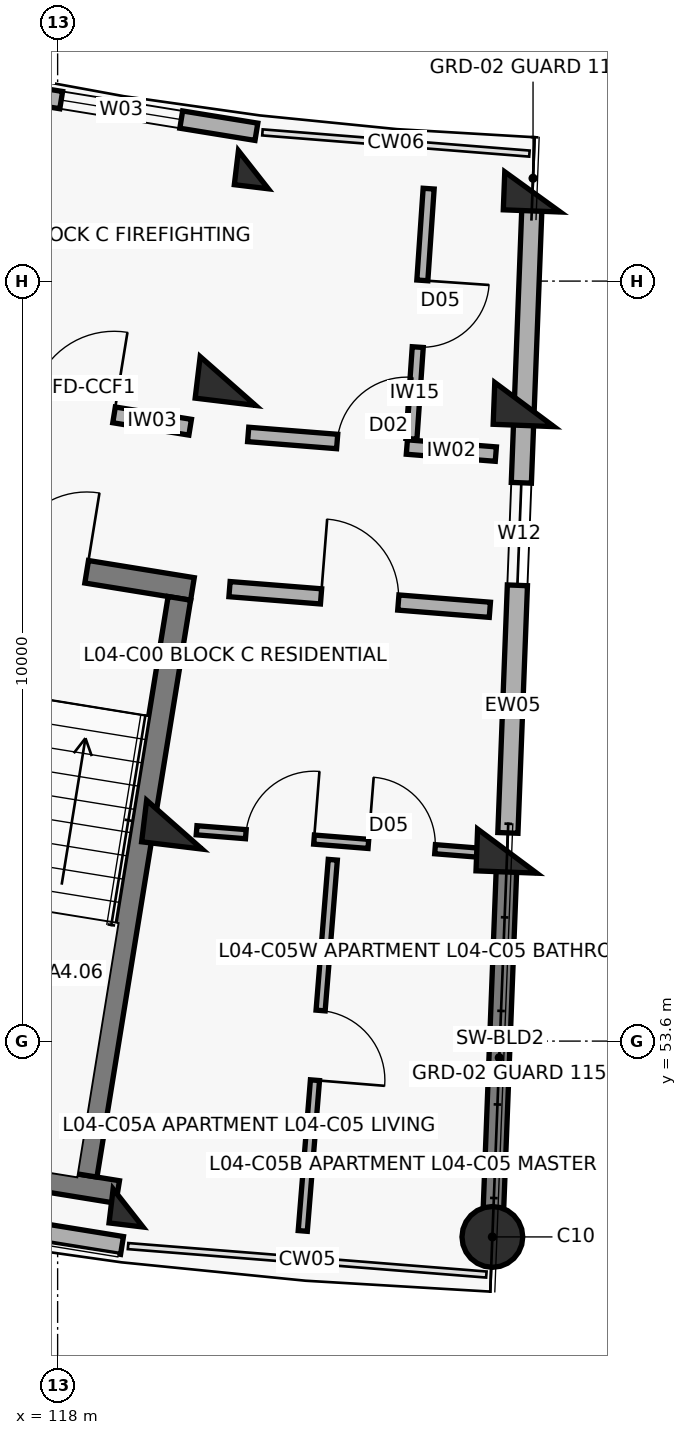
"""IFC4 building model, lengths in metres.
Left out: names, types, materials, properties, quantities, classifications, styles, units other than length and angle.
Written with IfcOpenShell. Run it as: python <this file> out.ifc"""

import sys

from ifc_helpers import new_model, si_unit, direction, frame, frame_2d, origin, origin_2d, place, context, subcontext, project, spatial, rectangle, circle, extrude, element, fill, save


model = new_model("IFC4")
c1 = context("Model", 3, precision=1e-05, world=origin(), true_north=direction((0.0, 1.0)))
c2 = subcontext(c1, "Body", "Model", "MODEL_VIEW")
j1 = project(units=[si_unit("LENGTHUNIT", "METRE"), si_unit("PLANEANGLEUNIT", "RADIAN")], contexts=[c1])
p1 = place(None, origin())
s1 = spatial("IfcSite", under=j1, at=p1, CompositionType="ELEMENT")
p2 = place(p1, origin())
s2 = spatial("IfcBuilding", under=s1, at=p2, CompositionType="ELEMENT")
p3 = place(p2, frame((0.0, 0.0, 14.3)))
s3 = spatial("IfcBuildingStorey", under=s2, at=p3, CompositionType="ELEMENT", Elevation=14.3)
p4 = place(p3, frame((120.575, 65.065, 0.0), z_axis=(0.0, 0.0, 1.0), x_axis=(-0.119790293837, -0.992799217114, 0.0)))
e1 = element("IfcColumn", 1, at=p4, inside=s3, PredefinedType="COLUMN", context=c2, shape_type="SweptSolid", body=[
    extrude(rectangle(XDim=0.45, YDim=0.45, at=origin_2d()), origin(), (0.0, 0.0, 1.0), 3.1),
])
for number, where, z_axis, x_axis in (
    (2, (120.24, 62.285, 0.0), (0.0, 0.0, 1.0), (-0.12, -0.993, 0.0)),
    (3, (119.535, 56.448, 0.0), (0.0, 0.0, 1.0), (-0.12, -0.993, 0.0)),
):
    element("IfcColumn", number, at=place(p3, frame(where, z_axis=z_axis, x_axis=x_axis)), inside=s3, PredefinedType="COLUMN", context=c2, shape_type="SweptSolid", body=[
        extrude(rectangle(XDim=0.55, YDim=0.8, at=origin_2d()), origin(), (0.0, 0.0, 1.0), 3.1),
    ])
p5 = place(p3, frame((118.927, 51.404, 0.0), z_axis=(0.0, 0.0, 1.0), x_axis=(-0.119790293837, -0.992799217114, 0.0)))
e4 = element("IfcColumn", 4, at=p5, inside=s3, PredefinedType="COLUMN", context=c2, shape_type="SweptSolid", body=[
    extrude(rectangle(XDim=0.45, YDim=0.45, at=origin_2d()), origin(), (0.0, 0.0, 1.0), 3.1),
])
p6 = place(p3, frame((124.248, 64.773, 0.0), z_axis=(0.0, 0.0, 1.0), x_axis=(-0.038387809088, -0.999262916411, 0.0)))
e5 = element("IfcColumn", 5, at=p6, inside=s3, PredefinedType="COLUMN", context=c2, shape_type="SweptSolid", body=[
    extrude(rectangle(XDim=0.5, YDim=0.75, at=origin_2d()), origin(), (0.0, 0.0, 1.0), 3.1),
])
for number, where, z_axis, x_axis in (
    (6, (124.14, 61.975, 0.0), (0.0, 0.0, 1.0), (-0.038, -0.999, 0.0)),
    (7, (123.915, 56.1, 0.0), (0.0, 0.0, 1.0), (-0.038, -0.999, 0.0)),
):
    element("IfcColumn", number, at=place(p3, frame(where, z_axis=z_axis, x_axis=x_axis)), inside=s3, PredefinedType="COLUMN", context=c2, shape_type="SweptSolid", body=[
        extrude(rectangle(XDim=0.55, YDim=0.8, at=origin_2d()), origin(), (0.0, 0.0, 1.0), 3.1),
    ])
p7 = place(p3, frame((123.72, 51.023, 0.0), z_axis=(0.0, 0.0, 1.0), x_axis=(-0.038387809088, -0.999262916411, 0.0)))
e8 = element("IfcColumn", 8, at=p7, inside=s3, PredefinedType="COLUMN", context=c2, shape_type="SweptSolid", body=[
    extrude(circle(Radius=0.4, at=origin_2d()), origin(), (0.0, 0.0, 1.0), 3.1),
])
p8 = place(p3, frame((123.908, 55.92, 0.0), z_axis=(0.0, 0.0, 1.0), x_axis=(-0.038381471406, -0.99926315986, 0.0)))
e9 = element("IfcWall", 9, at=p8, inside=s3, PredefinedType="SHEAR", context=c2, shape_type="SweptSolid", body=[
    extrude(rectangle(XDim=4.72, YDim=0.27, at=frame_2d((2.36, 0.0))), origin(), (0.0, 0.0, 1.0), 2.86),
])
p9 = place(p3, frame((114.1, 51.681, 0.0), z_axis=(0.0, 0.0, 1.0), x_axis=(0.987080750493, -0.160223568819, 0.0)))
e10 = element("IfcWall", 10, at=p9, inside=s3, PredefinedType="SOLIDWALL", context=c2, shape_type="SweptSolid", body=[
    extrude(rectangle(XDim=4.809, YDim=0.238, at=frame_2d((2.404, 0.0))), origin(), (0.0, 0.0, 1.0), 2.25),
])
p10 = place(p3, frame((117.058, 66.142, 0.0), z_axis=(0.0, 0.0, 1.0), x_axis=(0.987080874485, -0.160222804952, 0.0)))
e11 = element("IfcWall", 11, at=p10, inside=s3, PredefinedType="SOLIDWALL", context=c2, shape_type="SweptSolid", body=[
    extrude(rectangle(XDim=3.604, YDim=0.23, at=frame_2d((1.802, 0.0))), origin(), (0.0, 0.0, 1.0), 2.25),
])
p11 = place(p10, frame((1.002, 0.0, 0.32)))
e12 = element("IfcOpeningElement", 12, at=p11, cuts=e11, PredefinedType="OPENING", context=c2, shape_type="SweptSolid", body=[
    extrude(rectangle(XDim=1.6, YDim=1.5, at=frame_2d((0.8, 0.75))), frame((0.0, 0.125, 0.0), z_axis=(0.0, -1.0, 0.0), x_axis=(1.0, 0.0, 0.0)), (0.0, 0.0, 1.0), 0.25),
])
p12 = place(p3, frame((124.239, 64.533, 0.0), z_axis=(0.0, 0.0, 1.0), x_axis=(-0.038407966241, -0.999262141847, 0.0)))
e13 = element("IfcWall", 13, at=p12, inside=s3, PredefinedType="SOLIDWALL", context=c2, shape_type="SweptSolid", body=[
    extrude(rectangle(XDim=8.2, YDim=0.265, at=frame_2d((4.1, 0.0))), origin(), (0.0, 0.0, 1.0), 2.08),
])
p13 = place(p12, frame((3.59, 0.0, 0.75)))
e14 = element("IfcOpeningElement", 14, at=p13, cuts=e13, PredefinedType="OPENING", context=c2, shape_type="SweptSolid", body=[
    extrude(rectangle(XDim=1.35, YDim=1.35, at=frame_2d((0.675, 0.675))), frame((0.0, 0.142, 0.0), z_axis=(0.0, -1.0, 0.0), x_axis=(1.0, 0.0, 0.0)), (0.0, 0.0, 1.0), 0.285),
])
p14 = place(p3, frame((115.954, 60.169, 0.0), z_axis=(0.0, 0.0, 1.0), x_axis=(0.987077443397, -0.160243941341, 0.0)))
e15 = element("IfcWall", 15, at=p14, inside=s3, PredefinedType="SHEAR", context=c2, shape_type="SweptSolid", body=[
    extrude(rectangle(XDim=3.87, YDim=0.3, at=frame_2d((1.935, 0.0))), origin(), (0.0, 0.0, 1.0), 3.1),
])
p15 = place(p14, frame((1.41, 0.0, 0.0)))
e16 = element("IfcOpeningElement", 16, at=p15, cuts=e15, PredefinedType="OPENING", context=c2, shape_type="SweptSolid", body=[
    extrude(rectangle(XDim=1.05, YDim=2.15, at=frame_2d((0.525, 1.075))), frame((0.0, 0.16, 0.0), z_axis=(0.0, -1.0, 0.0), x_axis=(1.0, 0.0, 0.0)), (0.0, 0.0, 1.0), 0.32),
])
p16 = place(p3, frame((114.377, 52.331, 0.0), z_axis=(0.0, 0.0, 1.0), x_axis=(0.987077474317, -0.16024375088, 0.0)))
e17 = element("IfcWall", 17, at=p16, inside=s3, PredefinedType="SHEAR", context=c2, shape_type="SweptSolid", body=[
    extrude(rectangle(XDim=4.47, YDim=0.3, at=frame_2d((2.235, 0.0))), origin(), (0.0, 0.0, 1.0), 3.1),
])
p17 = place(p3, frame((119.602, 59.425, 0.0), z_axis=(0.0, 0.0, 1.0), x_axis=(-0.160201584773, -0.987084318706, 0.0)))
e18 = element("IfcWall", 18, at=p17, inside=s3, PredefinedType="SHEAR", context=c2, shape_type="SweptSolid", body=[
    extrude(rectangle(XDim=7.69, YDim=0.3, at=frame_2d((3.845, 0.0))), origin(), (0.0, 0.0, 1.0), 3.1),
])
p18 = place(p3, frame((116.656, 62.178, 0.0), z_axis=(0.0, 0.0, 1.0), x_axis=(0.987083140276, -0.16020884552, 0.0)))
e19 = element("IfcWall", 19, at=p18, inside=s3, PredefinedType="SOLIDWALL", context=c2, shape_type="SweptSolid", body=[
    extrude(rectangle(XDim=3.129, YDim=0.21, at=frame_2d((1.564, 0.0))), origin(), (0.0, 0.0, 1.0), 2.08),
])
p19 = place(p18, frame((1.014, 0.0, 0.0)))
e20 = element("IfcOpeningElement", 20, at=p19, cuts=e19, PredefinedType="OPENING", context=c2, shape_type="SweptSolid", body=[
    extrude(rectangle(XDim=1.1, YDim=2.15, at=frame_2d((0.55, 1.075))), frame((0.0, 0.115, 0.0), z_axis=(0.0, -1.0, 0.0), x_axis=(1.0, 0.0, 0.0)), (0.0, 0.0, 1.0), 0.23),
])
p20 = place(p3, frame((120.261, 59.547, 0.0), z_axis=(0.0, 0.0, 1.0), x_axis=(0.996862545573, -0.079152165058, 0.0)))
e21 = element("IfcWall", 21, at=p20, inside=s3, PredefinedType="SOLIDWALL", context=c2, shape_type="SweptSolid", body=[
    extrude(rectangle(XDim=3.436, YDim=0.2, at=frame_2d((1.718, 0.0))), origin(), (0.0, 0.0, 1.0), 2.08),
])
p21 = place(p20, frame((1.208, 0.0, 0.0)))
e22 = element("IfcOpeningElement", 22, at=p21, cuts=e21, PredefinedType="OPENING", context=c2, shape_type="SweptSolid", body=[
    extrude(rectangle(XDim=1.02, YDim=2.15, at=frame_2d((0.51, 1.075))), frame((0.0, 0.11, 0.0), z_axis=(0.0, -1.0, 0.0), x_axis=(1.0, 0.0, 0.0)), (0.0, 0.0, 1.0), 0.22),
])
p22 = place(p3, frame((120.507, 61.582, 0.0), z_axis=(0.0, 0.0, 1.0), x_axis=(0.996860715473, -0.07917521043, 0.0)))
e23 = element("IfcWall", 23, at=p22, inside=s3, PredefinedType="SOLIDWALL", context=c2, shape_type="SweptSolid", body=[
    extrude(rectangle(XDim=3.269, YDim=0.19, at=frame_2d((1.634, 0.0))), origin(), (0.0, 0.0, 1.0), 2.08),
])
p23 = place(p22, frame((1.174, 0.0, 0.0)))
e24 = element("IfcOpeningElement", 24, at=p23, cuts=e23, PredefinedType="OPENING", context=c2, shape_type="SweptSolid", body=[
    extrude(rectangle(XDim=0.92, YDim=2.1, at=frame_2d((0.46, 1.05))), frame((0.0, 0.105, 0.0), z_axis=(0.0, -1.0, 0.0), x_axis=(1.0, 0.0, 0.0)), (0.0, 0.0, 1.0), 0.21),
])
p24 = place(p3, frame((122.881, 64.816, 0.0), z_axis=(0.0, 0.0, 1.0), x_axis=(-0.068581194944, -0.997645538105, 0.0)))
e25 = element("IfcWall", 25, at=p24, inside=s3, PredefinedType="PARTITIONING", context=c2, shape_type="SweptSolid", body=[
    extrude(rectangle(XDim=3.3, YDim=0.145, at=frame_2d((1.65, 0.0))), origin(), (0.0, 0.0, 1.0), 2.08),
])
p25 = place(p24, frame((1.21, 0.0, 0.0)))
e26 = element("IfcOpeningElement", 26, at=p25, cuts=e25, PredefinedType="OPENING", context=c2, shape_type="SweptSolid", body=[
    extrude(rectangle(XDim=0.88, YDim=2.1, at=frame_2d((0.44, 1.05))), frame((0.0, 0.083, 0.0), z_axis=(0.0, -1.0, 0.0), x_axis=(1.0, 0.0, 0.0)), (0.0, 0.0, 1.0), 0.165),
])
p26 = place(p3, frame((119.828, 56.374, 0.0), z_axis=(0.0, 0.0, 1.0), x_axis=(0.996863138536, -0.079144696778, 0.0)))
e27 = element("IfcWall", 27, at=p26, inside=s3, PredefinedType="PARTITIONING", context=c2, shape_type="SweptSolid", body=[
    extrude(rectangle(XDim=3.797, YDim=0.12, at=frame_2d((1.899, 0.0))), origin(), (0.0, 0.0, 1.0), 2.08),
])
p27 = place(p26, frame((0.65, 0.0, 0.0)))
e28 = element("IfcOpeningElement", 28, at=p27, cuts=e27, PredefinedType="OPENING", context=c2, shape_type="SweptSolid", body=[
    extrude(rectangle(XDim=0.9, YDim=2.1, at=frame_2d((0.45, 1.05))), frame((0.0, 0.07, 0.0), z_axis=(0.0, -1.0, 0.0), x_axis=(1.0, 0.0, 0.0)), (0.0, 0.0, 1.0), 0.14),
])
p28 = place(p26, frame((2.267, 0.0, 0.0)))
e29 = element("IfcOpeningElement", 29, at=p28, cuts=e27, PredefinedType="OPENING", context=c2, shape_type="SweptSolid", body=[
    extrude(rectangle(XDim=0.88, YDim=2.1, at=frame_2d((0.44, 1.05))), frame((0.0, 0.07, 0.0), z_axis=(0.0, -1.0, 0.0), x_axis=(1.0, 0.0, 0.0)), (0.0, 0.0, 1.0), 0.14),
])
p29 = place(p3, frame((121.62, 55.986, 0.0), z_axis=(0.0, 0.0, 1.0), x_axis=(-0.080666032472, -0.996741185667, 0.0)))
e30 = element("IfcWall", 30, at=p29, inside=s3, PredefinedType="PARTITIONING", context=c2, shape_type="SweptSolid", body=[
    extrude(rectangle(XDim=4.9, YDim=0.12, at=frame_2d((2.45, 0.0))), origin(), (0.0, 0.0, 1.0), 2.08),
])
p30 = place(p29, frame((1.99, 0.0, 0.0)))
e31 = element("IfcOpeningElement", 31, at=p30, cuts=e30, PredefinedType="OPENING", context=c2, shape_type="SweptSolid", body=[
    extrude(rectangle(XDim=0.92, YDim=2.1, at=frame_2d((0.46, 1.05))), frame((0.0, 0.07, 0.0), z_axis=(0.0, -1.0, 0.0), x_axis=(1.0, 0.0, 0.0)), (0.0, 0.0, 1.0), 0.14),
])
p31 = place(p11, origin())
e32 = element("IfcWindow", 32, at=p31, inside=s3, PartitioningType="DOUBLE_PANEL_VERTICAL", PredefinedType="WINDOW", context=c2, shape_type="SweptSolid", body=[
    extrude(rectangle(XDim=1.6, YDim=1.5, at=frame_2d((0.8, 0.75))), frame((0.0, 0.03, 0.0), z_axis=(0.0, -1.0, 0.0), x_axis=(1.0, 0.0, 0.0)), (0.0, 0.0, 1.0), 0.06),
])
fill(e12, e32)
p32 = place(p13, origin())
e33 = element("IfcWindow", 33, at=p32, inside=s3, PartitioningType="DOUBLE_PANEL_VERTICAL", PredefinedType="WINDOW", context=c2, shape_type="SweptSolid", body=[
    extrude(rectangle(XDim=1.35, YDim=1.35, at=frame_2d((0.675, 0.675))), frame((0.0, 0.03, 0.0), z_axis=(0.0, -1.0, 0.0), x_axis=(1.0, 0.0, 0.0)), (0.0, 0.0, 1.0), 0.06),
])
fill(e14, e33)
p33 = place(p15, origin())
e34 = element("IfcDoor", 34, at=p33, inside=s3, OperationType="SINGLE_SWING_RIGHT", PredefinedType="DOOR", context=c2, shape_type="SweptSolid", body=[
    extrude(rectangle(XDim=1.05, YDim=2.15, at=frame_2d((0.525, 1.075))), frame((0.0, 0.025, 0.0), z_axis=(0.0, -1.0, 0.0), x_axis=(1.0, 0.0, 0.0)), (0.0, 0.0, 1.0), 0.05),
])
fill(e16, e34)
p34 = place(p19, origin())
e35 = element("IfcDoor", 35, at=p34, inside=s3, OperationType="SINGLE_SWING_RIGHT", PredefinedType="DOOR", context=c2, shape_type="SweptSolid", body=[
    extrude(rectangle(XDim=1.1, YDim=2.15, at=frame_2d((0.55, 1.075))), frame((0.0, 0.025, 0.0), z_axis=(0.0, -1.0, 0.0), x_axis=(1.0, 0.0, 0.0)), (0.0, 0.0, 1.0), 0.05),
])
fill(e20, e35)
p35 = place(p21, origin())
e36 = element("IfcDoor", 36, at=p35, inside=s3, OperationType="SINGLE_SWING_LEFT", PredefinedType="DOOR", context=c2, shape_type="SweptSolid", body=[
    extrude(rectangle(XDim=1.02, YDim=2.15, at=frame_2d((0.51, 1.075))), frame((0.0, 0.025, 0.0), z_axis=(0.0, -1.0, 0.0), x_axis=(1.0, 0.0, 0.0)), (0.0, 0.0, 1.0), 0.05),
])
fill(e22, e36)
p36 = place(p23, origin())
e37 = element("IfcDoor", 37, at=p36, inside=s3, OperationType="SINGLE_SWING_RIGHT", PredefinedType="DOOR", context=c2, shape_type="SweptSolid", body=[
    extrude(rectangle(XDim=0.92, YDim=2.1, at=frame_2d((0.46, 1.05))), frame((0.0, 0.025, 0.0), z_axis=(0.0, -1.0, 0.0), x_axis=(1.0, 0.0, 0.0)), (0.0, 0.0, 1.0), 0.05),
])
fill(e24, e37)
p37 = place(p25, origin())
e38 = element("IfcDoor", 38, at=p37, inside=s3, OperationType="SINGLE_SWING_LEFT", PredefinedType="DOOR", context=c2, shape_type="SweptSolid", body=[
    extrude(rectangle(XDim=0.88, YDim=2.1, at=frame_2d((0.44, 1.05))), frame((0.0, 0.025, 0.0), z_axis=(0.0, -1.0, 0.0), x_axis=(1.0, 0.0, 0.0)), (0.0, 0.0, 1.0), 0.05),
])
fill(e26, e38)
p38 = place(p27, origin())
e39 = element("IfcDoor", 39, at=p38, inside=s3, OperationType="SINGLE_SWING_RIGHT", PredefinedType="DOOR", context=c2, shape_type="SweptSolid", body=[
    extrude(rectangle(XDim=0.9, YDim=2.1, at=frame_2d((0.45, 1.05))), frame((0.0, 0.025, 0.0), z_axis=(0.0, -1.0, 0.0), x_axis=(1.0, 0.0, 0.0)), (0.0, 0.0, 1.0), 0.05),
])
fill(e28, e39)
p39 = place(p28, origin())
e40 = element("IfcDoor", 40, at=p39, inside=s3, OperationType="SINGLE_SWING_LEFT", PredefinedType="DOOR", context=c2, shape_type="SweptSolid", body=[
    extrude(rectangle(XDim=0.88, YDim=2.1, at=frame_2d((0.44, 1.05))), frame((0.0, 0.025, 0.0), z_axis=(0.0, -1.0, 0.0), x_axis=(1.0, 0.0, 0.0)), (0.0, 0.0, 1.0), 0.05),
])
fill(e29, e40)
p40 = place(p30, origin())
e41 = element("IfcDoor", 41, at=p40, inside=s3, OperationType="SINGLE_SWING_RIGHT", PredefinedType="DOOR", context=c2, shape_type="SweptSolid", body=[
    extrude(rectangle(XDim=0.92, YDim=2.1, at=frame_2d((0.46, 1.05))), frame((0.0, 0.025, 0.0), z_axis=(0.0, -1.0, 0.0), x_axis=(1.0, 0.0, 0.0)), (0.0, 0.0, 1.0), 0.05),
])
fill(e31, e41)
save(model, sys.argv[1])
